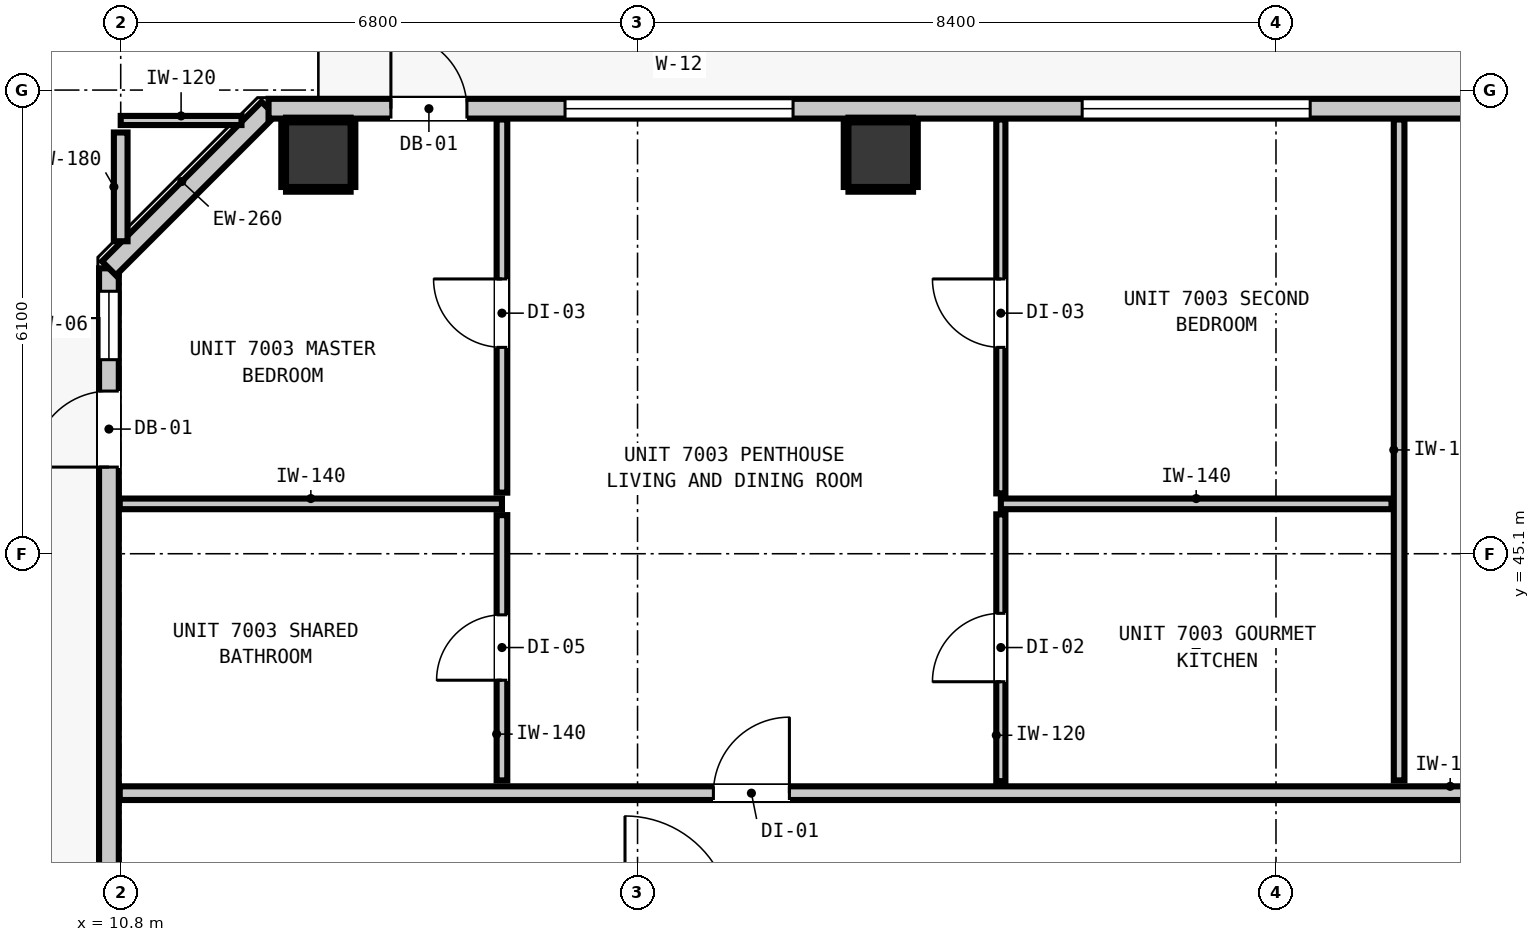
"""IFC4 building model, lengths in metres.
Left out: names, types, materials, properties, quantities, classifications, styles, units other than length and angle.
Written with IfcOpenShell. Run it as: python <this file> out.ifc"""

import sys

from ifc_helpers import new_model, si_unit, direction, frame, frame_2d, origin, origin_2d, place, context, subcontext, project, spatial, rectangle, extrude, element, fill, save


model = new_model("IFC4")
c1 = context("Model", 3, precision=1e-05, world=origin(), true_north=direction((0.0, 1.0)))
c2 = subcontext(c1, "Body", "Model", "MODEL_VIEW")
j1 = project(units=[si_unit("LENGTHUNIT", "METRE"), si_unit("PLANEANGLEUNIT", "RADIAN")], contexts=[c1])
p1 = place(None, origin())
s1 = spatial("IfcSite", under=j1, at=p1, CompositionType="ELEMENT")
p2 = place(p1, origin())
s2 = spatial("IfcBuilding", under=s1, at=p2, CompositionType="ELEMENT")
p3 = place(p2, frame((0.0, 0.0, 241.24)))
s3 = spatial("IfcBuildingStorey", under=s2, at=p3, CompositionType="ELEMENT", Elevation=241.24)
for number, where, z_axis, x_axis in (
    (1, (13.4, 50.35, 0.0), (0.0, 0.0, 1.0), (1.0, 0.0, 0.0)),
    (2, (20.8, 50.35, 0.0), (0.0, 0.0, 1.0), (1.0, 0.0, 0.0)),
):
    element("IfcColumn", number, at=place(p3, frame(where, z_axis=z_axis, x_axis=x_axis)), inside=s3, PredefinedType="COLUMN", context=c2, shape_type="SweptSolid", body=[
        extrude(rectangle(XDim=0.85, YDim=0.85, at=origin_2d()), origin(), (0.0, 0.0, 1.0), 3.32),
    ])
p4 = place(p3, frame((10.645, 18.545, 0.0), z_axis=(0.0, 0.0, 1.0), x_axis=(0.0, 1.0, 0.0)))
e3 = element("IfcWall", 3, at=p4, inside=s3, PredefinedType="STANDARD", context=c2, shape_type="SweptSolid", body=[
    extrude(rectangle(XDim=30.31, YDim=0.26, at=frame_2d((15.155, 0.0))), origin(), (0.0, 0.0, 1.0), 3.1),
])
p5 = place(p4, frame((27.695, 0.0, 0.0)))
e4 = element("IfcOpeningElement", 4, at=p5, cuts=e3, PredefinedType="OPENING", context=c2, shape_type="SweptSolid", body=[
    extrude(rectangle(XDim=1.0, YDim=2.15, at=frame_2d((0.5, 1.075))), frame((0.0, 0.14, 0.0), z_axis=(0.0, -1.0, 0.0), x_axis=(1.0, 0.0, 0.0)), (0.0, 0.0, 1.0), 0.28),
])
p6 = place(p4, frame((29.108, 0.0, 0.85)))
e5 = element("IfcOpeningElement", 5, at=p6, cuts=e3, PredefinedType="OPENING", context=c2, shape_type="SweptSolid", body=[
    extrude(rectangle(XDim=0.9, YDim=1.5, at=frame_2d((0.45, 0.75))), frame((0.0, 0.14, 0.0), z_axis=(0.0, -1.0, 0.0), x_axis=(1.0, 0.0, 0.0)), (0.0, 0.0, 1.0), 0.28),
])
p7 = place(p3, frame((10.645, 48.855, 0.0), z_axis=(0.0, 0.0, 1.0), x_axis=(0.707106781187, 0.707106781187, 0.0)))
e6 = element("IfcWall", 6, at=p7, inside=s3, PredefinedType="STANDARD", context=c2, shape_type="SweptSolid", body=[
    extrude(rectangle(XDim=2.97, YDim=0.26, at=frame_2d((1.485, 0.0))), origin(), (0.0, 0.0, 1.0), 3.1),
])
p8 = place(p3, frame((12.745, 50.955, 0.0), z_axis=(0.0, 0.0, 1.0), x_axis=(1.0, 0.0, 0.0)))
e7 = element("IfcWall", 7, at=p8, inside=s3, PredefinedType="STANDARD", context=c2, shape_type="SweptSolid", body=[
    extrude(rectangle(XDim=32.71, YDim=0.26, at=frame_2d((16.355, 0.0))), origin(), (0.0, 0.0, 1.0), 3.1),
])
p9 = place(p8, frame((1.61, 0.0, 0.0)))
e8 = element("IfcOpeningElement", 8, at=p9, cuts=e7, PredefinedType="OPENING", context=c2, shape_type="SweptSolid", body=[
    extrude(rectangle(XDim=1.0, YDim=2.15, at=frame_2d((0.5, 1.075))), frame((0.0, 0.14, 0.0), z_axis=(0.0, -1.0, 0.0), x_axis=(1.0, 0.0, 0.0)), (0.0, 0.0, 1.0), 0.28),
])
p10 = place(p8, frame((3.901, 0.0, 0.85)))
e9 = element("IfcOpeningElement", 9, at=p10, cuts=e7, PredefinedType="OPENING", context=c2, shape_type="SweptSolid", body=[
    extrude(rectangle(XDim=3.0, YDim=2.1, at=frame_2d((1.5, 1.05))), frame((0.0, 0.14, 0.0), z_axis=(0.0, -1.0, 0.0), x_axis=(1.0, 0.0, 0.0)), (0.0, 0.0, 1.0), 0.28),
])
p11 = place(p8, frame((10.705, 0.0, 0.85)))
e10 = element("IfcOpeningElement", 10, at=p11, cuts=e7, PredefinedType="OPENING", context=c2, shape_type="SweptSolid", body=[
    extrude(rectangle(XDim=3.0, YDim=2.1, at=frame_2d((1.5, 1.05))), frame((0.0, 0.14, 0.0), z_axis=(0.0, -1.0, 0.0), x_axis=(1.0, 0.0, 0.0)), (0.0, 0.0, 1.0), 0.28),
])
p12 = place(p8, frame((26.9, 0.0, 0.85)))
e11 = element("IfcOpeningElement", 11, at=p12, cuts=e7, PredefinedType="OPENING", context=c2, shape_type="SweptSolid", body=[
    extrude(rectangle(XDim=3.0, YDim=2.1, at=frame_2d((1.5, 1.05))), frame((0.0, 0.14, 0.0), z_axis=(0.0, -1.0, 0.0), x_axis=(1.0, 0.0, 0.0)), (0.0, 0.0, 1.0), 0.28),
])
p13 = place(p3, frame((10.787, 41.95, 0.0), z_axis=(0.0, 0.0, 1.0), x_axis=(1.0, 0.0, 0.0)))
e12 = element("IfcWall", 12, at=p13, inside=s3, PredefinedType="PARTITIONING", context=c2, shape_type="SweptSolid", body=[
    extrude(rectangle(XDim=36.626, YDim=0.18, at=frame_2d((18.313, 0.0))), origin(), (0.0, 0.0, 1.0), 3.1),
])
p14 = place(p13, frame((7.811, 0.0, 0.0)))
e13 = element("IfcOpeningElement", 13, at=p14, cuts=e12, PredefinedType="OPENING", context=c2, shape_type="SweptSolid", body=[
    extrude(rectangle(XDim=1.0, YDim=2.15, at=frame_2d((0.5, 1.075))), frame((0.0, 0.1, 0.0), z_axis=(0.0, -1.0, 0.0), x_axis=(1.0, 0.0, 0.0)), (0.0, 0.0, 1.0), 0.2),
])
p15 = place(p13, frame((26.199, 0.0, 0.0)))
e14 = element("IfcOpeningElement", 14, at=p15, cuts=e12, PredefinedType="OPENING", context=c2, shape_type="SweptSolid", body=[
    extrude(rectangle(XDim=0.9, YDim=2.1, at=frame_2d((0.45, 1.05))), frame((0.0, 0.1, 0.0), z_axis=(0.0, -1.0, 0.0), x_axis=(1.0, 0.0, 0.0)), (0.0, 0.0, 1.0), 0.2),
])
p16 = place(p3, frame((10.787, 45.756, 0.0), z_axis=(0.0, 0.0, 1.0), x_axis=(1.0, 0.0, 0.0)))
e15 = element("IfcWall", 15, at=p16, inside=s3, PredefinedType="PARTITIONING", context=c2, shape_type="SweptSolid", body=[
    extrude(rectangle(XDim=5.029, YDim=0.14, at=frame_2d((2.514, 0.0))), origin(), (0.0, 0.0, 1.0), 3.1),
])
p17 = place(p3, frame((22.38, 45.756, 0.0), z_axis=(0.0, 0.0, 1.0), x_axis=(1.0, 0.0, 0.0)))
e16 = element("IfcWall", 16, at=p17, inside=s3, PredefinedType="PARTITIONING", context=c2, shape_type="SweptSolid", body=[
    extrude(rectangle(XDim=5.14, YDim=0.14, at=frame_2d((2.57, 0.0))), origin(), (0.0, 0.0, 1.0), 3.1),
])
p18 = place(p3, frame((10.8, 50.8, 0.0), z_axis=(0.0, 0.0, 1.0), x_axis=(1.0, 0.0, 0.0)))
e17 = element("IfcWall", 17, at=p18, inside=s3, PredefinedType="PARTITIONING", context=c2, shape_type="SweptSolid", body=[
    extrude(rectangle(XDim=1.589, YDim=0.12, at=frame_2d((0.794, 0.0))), origin(), (0.0, 0.0, 1.0), 3.1),
])
p19 = place(p3, frame((10.8, 49.211, 0.0), z_axis=(0.0, 0.0, 1.0), x_axis=(0.0, 1.0, 0.0)))
e18 = element("IfcWall", 18, at=p19, inside=s3, PredefinedType="PARTITIONING", context=c2, shape_type="SweptSolid", body=[
    extrude(rectangle(XDim=1.431, YDim=0.18, at=frame_2d((0.716, 0.0))), origin(), (0.0, 0.0, 1.0), 3.1),
])
p20 = place(p3, frame((15.816, 42.118, 0.0), z_axis=(0.0, 0.0, 1.0), x_axis=(0.0, 1.0, 0.0)))
e19 = element("IfcWall", 19, at=p20, inside=s3, PredefinedType="PARTITIONING", context=c2, shape_type="SweptSolid", body=[
    extrude(rectangle(XDim=3.49, YDim=0.14, at=frame_2d((1.745, 0.0))), origin(), (0.0, 0.0, 1.0), 3.1),
])
p21 = place(p20, frame((1.318, 0.0, 0.0)))
e20 = element("IfcOpeningElement", 20, at=p21, cuts=e19, PredefinedType="OPENING", context=c2, shape_type="SweptSolid", body=[
    extrude(rectangle(XDim=0.86, YDim=2.02, at=frame_2d((0.43, 1.01))), frame((0.0, 0.08, 0.0), z_axis=(0.0, -1.0, 0.0), x_axis=(1.0, 0.0, 0.0)), (0.0, 0.0, 1.0), 0.16),
])
p22 = place(p3, frame((15.816, 45.904, 0.0), z_axis=(0.0, 0.0, 1.0), x_axis=(0.0, 1.0, 0.0)))
e21 = element("IfcWall", 21, at=p22, inside=s3, PredefinedType="PARTITIONING", context=c2, shape_type="SweptSolid", body=[
    extrude(rectangle(XDim=4.909, YDim=0.14, at=frame_2d((2.455, 0.0))), origin(), (0.0, 0.0, 1.0), 3.1),
])
p23 = place(p22, frame((1.911, 0.0, 0.0)))
e22 = element("IfcOpeningElement", 22, at=p23, cuts=e21, PredefinedType="OPENING", context=c2, shape_type="SweptSolid", body=[
    extrude(rectangle(XDim=0.9, YDim=2.1, at=frame_2d((0.45, 1.05))), frame((0.0, 0.08, 0.0), z_axis=(0.0, -1.0, 0.0), x_axis=(1.0, 0.0, 0.0)), (0.0, 0.0, 1.0), 0.16),
])
p24 = place(p3, frame((27.62, 42.118, 0.0), z_axis=(0.0, 0.0, 1.0), x_axis=(0.0, 1.0, 0.0)))
e23 = element("IfcWall", 23, at=p24, inside=s3, PredefinedType="PARTITIONING", context=c2, shape_type="SweptSolid", body=[
    extrude(rectangle(XDim=8.695, YDim=0.14, at=frame_2d((4.348, 0.0))), origin(), (0.0, 0.0, 1.0), 3.1),
])
p25 = place(p3, frame((22.38, 42.108, 0.0), z_axis=(0.0, 0.0, 1.0), x_axis=(0.0, 1.0, 0.0)))
e24 = element("IfcWall", 24, at=p25, inside=s3, PredefinedType="PARTITIONING", context=c2, shape_type="SweptSolid", body=[
    extrude(rectangle(XDim=3.51, YDim=0.12, at=frame_2d((1.755, 0.0))), origin(), (0.0, 0.0, 1.0), 3.1),
])
p26 = place(p25, frame((1.308, 0.0, 0.0)))
e25 = element("IfcOpeningElement", 25, at=p26, cuts=e24, PredefinedType="OPENING", context=c2, shape_type="SweptSolid", body=[
    extrude(rectangle(XDim=0.9, YDim=2.1, at=frame_2d((0.45, 1.05))), frame((0.0, 0.07, 0.0), z_axis=(0.0, -1.0, 0.0), x_axis=(1.0, 0.0, 0.0)), (0.0, 0.0, 1.0), 0.14),
])
p27 = place(p3, frame((22.38, 45.894, 0.0), z_axis=(0.0, 0.0, 1.0), x_axis=(0.0, 1.0, 0.0)))
e26 = element("IfcWall", 26, at=p27, inside=s3, PredefinedType="PARTITIONING", context=c2, shape_type="SweptSolid", body=[
    extrude(rectangle(XDim=4.919, YDim=0.12, at=frame_2d((2.459, 0.0))), origin(), (0.0, 0.0, 1.0), 3.1),
])
p28 = place(p27, frame((1.921, 0.0, 0.0)))
e27 = element("IfcOpeningElement", 27, at=p28, cuts=e26, PredefinedType="OPENING", context=c2, shape_type="SweptSolid", body=[
    extrude(rectangle(XDim=0.9, YDim=2.1, at=frame_2d((0.45, 1.05))), frame((0.0, 0.07, 0.0), z_axis=(0.0, -1.0, 0.0), x_axis=(1.0, 0.0, 0.0)), (0.0, 0.0, 1.0), 0.14),
])
for number, where, z_axis, x_axis in (
    (28, (12.975, 49.893, 0.0), (0.0, 0.0, 1.0), (1.0, 0.0, 0.0)),
    (29, (12.975, 50.807, 0.0), (0.0, 0.0, 1.0), (1.0, 0.0, 0.0)),
    (30, (12.943, 49.925, 0.0), (0.0, 0.0, 1.0), (0.0, 1.0, 0.0)),
    (31, (13.857, 49.925, 0.0), (0.0, 0.0, 1.0), (0.0, 1.0, 0.0)),
):
    element("IfcWall", number, at=place(p3, frame(where, z_axis=z_axis, x_axis=x_axis)), inside=s3, PredefinedType="PARTITIONING", context=c2, shape_type="SweptSolid", body=[
        extrude(rectangle(XDim=0.85, YDim=0.06, at=frame_2d((0.425, 0.0))), origin(), (0.0, 0.0, 1.0), 1.45),
    ])
for number, where, z_axis, x_axis in (
    (32, (20.375, 49.893, 0.0), (0.0, 0.0, 1.0), (1.0, 0.0, 0.0)),
    (33, (20.375, 50.807, 0.0), (0.0, 0.0, 1.0), (1.0, 0.0, 0.0)),
):
    element("IfcWall", number, at=place(p3, frame(where, z_axis=z_axis, x_axis=x_axis)), inside=s3, PredefinedType="PARTITIONING", context=c2, shape_type="SweptSolid", body=[
        extrude(rectangle(XDim=0.85, YDim=0.06, at=frame_2d((0.425, 0.0))), origin(), (0.0, 0.0, 1.0), 1.45),
    ])
for number, where, z_axis, x_axis in (
    (34, (20.343, 49.925, 0.0), (0.0, 0.0, 1.0), (0.0, 1.0, 0.0)),
    (35, (21.257, 49.925, 0.0), (0.0, 0.0, 1.0), (0.0, 1.0, 0.0)),
):
    element("IfcWall", number, at=place(p3, frame(where, z_axis=z_axis, x_axis=x_axis)), inside=s3, PredefinedType="PARTITIONING", context=c2, shape_type="SweptSolid", body=[
        extrude(rectangle(XDim=0.85, YDim=0.06, at=frame_2d((0.425, 0.0))), origin(), (0.0, 0.0, 1.0), 1.45),
    ])
p29 = place(p9, origin())
e36 = element("IfcDoor", 36, at=p29, inside=s3, OperationType="SINGLE_SWING_LEFT", PredefinedType="DOOR", context=c2, shape_type="SweptSolid", body=[
    extrude(rectangle(XDim=1.0, YDim=2.15, at=frame_2d((0.5, 1.075))), frame((0.0, 0.025, 0.0), z_axis=(0.0, -1.0, 0.0), x_axis=(1.0, 0.0, 0.0)), (0.0, 0.0, 1.0), 0.05),
])
fill(e8, e36)
p30 = place(p5, origin())
e37 = element("IfcDoor", 37, at=p30, inside=s3, OperationType="SINGLE_SWING_LEFT", PredefinedType="DOOR", context=c2, shape_type="SweptSolid", body=[
    extrude(rectangle(XDim=1.0, YDim=2.15, at=frame_2d((0.5, 1.075))), frame((0.0, 0.025, 0.0), z_axis=(0.0, -1.0, 0.0), x_axis=(1.0, 0.0, 0.0)), (0.0, 0.0, 1.0), 0.05),
])
fill(e4, e37)
p31 = place(p6, origin())
e38 = element("IfcWindow", 38, at=p31, inside=s3, PartitioningType="SINGLE_PANEL", PredefinedType="WINDOW", context=c2, shape_type="SweptSolid", body=[
    extrude(rectangle(XDim=0.9, YDim=1.5, at=frame_2d((0.45, 0.75))), frame((0.0, 0.03, 0.0), z_axis=(0.0, -1.0, 0.0), x_axis=(1.0, 0.0, 0.0)), (0.0, 0.0, 1.0), 0.06),
])
fill(e5, e38)
p32 = place(p10, origin())
e39 = element("IfcWindow", 39, at=p32, inside=s3, PartitioningType="SINGLE_PANEL", PredefinedType="WINDOW", context=c2, shape_type="SweptSolid", body=[
    extrude(rectangle(XDim=3.0, YDim=2.1, at=frame_2d((1.5, 1.05))), frame((0.0, 0.03, 0.0), z_axis=(0.0, -1.0, 0.0), x_axis=(1.0, 0.0, 0.0)), (0.0, 0.0, 1.0), 0.06),
])
fill(e9, e39)
p33 = place(p11, origin())
e40 = element("IfcWindow", 40, at=p33, inside=s3, PartitioningType="SINGLE_PANEL", PredefinedType="WINDOW", context=c2, shape_type="SweptSolid", body=[
    extrude(rectangle(XDim=3.0, YDim=2.1, at=frame_2d((1.5, 1.05))), frame((0.0, 0.03, 0.0), z_axis=(0.0, -1.0, 0.0), x_axis=(1.0, 0.0, 0.0)), (0.0, 0.0, 1.0), 0.06),
])
fill(e10, e40)
p34 = place(p14, origin())
e41 = element("IfcDoor", 41, at=p34, inside=s3, OperationType="SINGLE_SWING_RIGHT", PredefinedType="DOOR", context=c2, shape_type="SweptSolid", body=[
    extrude(rectangle(XDim=1.0, YDim=2.15, at=frame_2d((0.5, 1.075))), frame((0.0, 0.025, 0.0), z_axis=(0.0, -1.0, 0.0), x_axis=(1.0, 0.0, 0.0)), (0.0, 0.0, 1.0), 0.05),
])
fill(e13, e41)
p35 = place(p21, origin())
e42 = element("IfcDoor", 42, at=p35, inside=s3, OperationType="SINGLE_SWING_LEFT", PredefinedType="DOOR", context=c2, shape_type="SweptSolid", body=[
    extrude(rectangle(XDim=0.86, YDim=2.02, at=frame_2d((0.43, 1.01))), frame((0.0, 0.025, 0.0), z_axis=(0.0, -1.0, 0.0), x_axis=(1.0, 0.0, 0.0)), (0.0, 0.0, 1.0), 0.05),
])
fill(e20, e42)
p36 = place(p23, origin())
e43 = element("IfcDoor", 43, at=p36, inside=s3, OperationType="SINGLE_SWING_RIGHT", PredefinedType="DOOR", context=c2, shape_type="SweptSolid", body=[
    extrude(rectangle(XDim=0.9, YDim=2.1, at=frame_2d((0.45, 1.05))), frame((0.0, 0.025, 0.0), z_axis=(0.0, -1.0, 0.0), x_axis=(1.0, 0.0, 0.0)), (0.0, 0.0, 1.0), 0.05),
])
fill(e22, e43)
p37 = place(p26, origin())
e44 = element("IfcDoor", 44, at=p37, inside=s3, OperationType="SINGLE_SWING_LEFT", PredefinedType="DOOR", context=c2, shape_type="SweptSolid", body=[
    extrude(rectangle(XDim=0.9, YDim=2.1, at=frame_2d((0.45, 1.05))), frame((0.0, 0.025, 0.0), z_axis=(0.0, -1.0, 0.0), x_axis=(1.0, 0.0, 0.0)), (0.0, 0.0, 1.0), 0.05),
])
fill(e25, e44)
p38 = place(p28, origin())
e45 = element("IfcDoor", 45, at=p38, inside=s3, OperationType="SINGLE_SWING_RIGHT", PredefinedType="DOOR", context=c2, shape_type="SweptSolid", body=[
    extrude(rectangle(XDim=0.9, YDim=2.1, at=frame_2d((0.45, 1.05))), frame((0.0, 0.025, 0.0), z_axis=(0.0, -1.0, 0.0), x_axis=(1.0, 0.0, 0.0)), (0.0, 0.0, 1.0), 0.05),
])
fill(e27, e45)
save(model, sys.argv[1])
